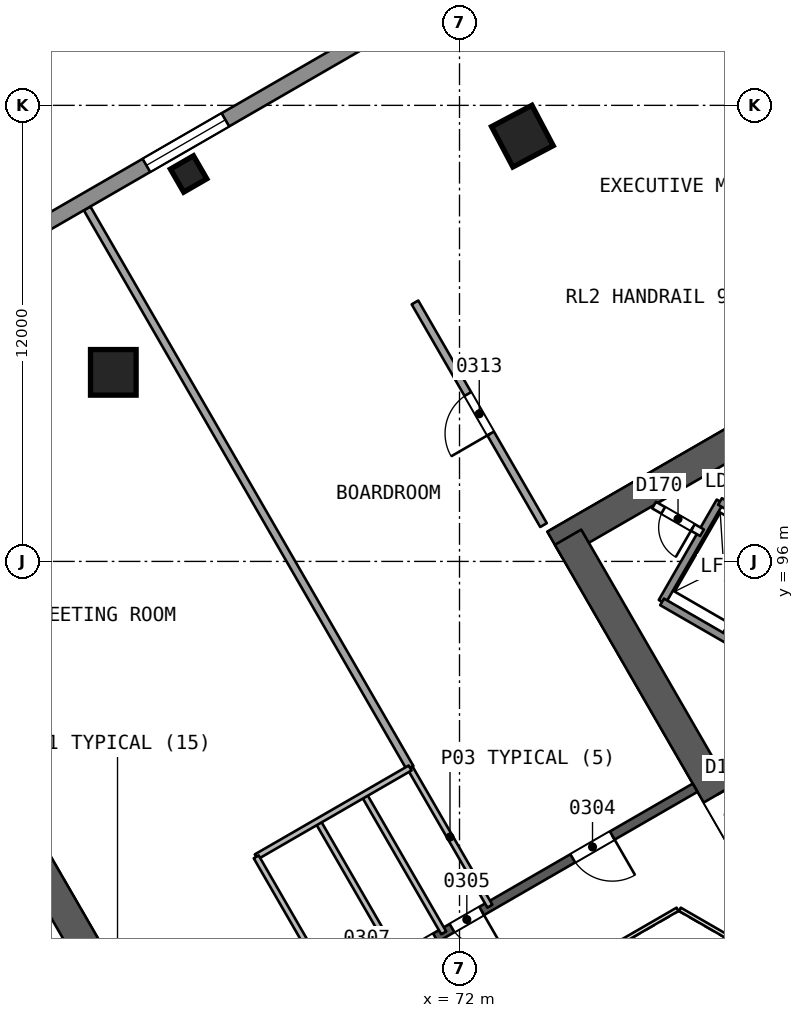
"""IFC4 building model, lengths in metres.
Left out: names, types, materials, properties, quantities, classifications, styles, units other than length and angle.
Written with IfcOpenShell. Run it as: python <this file> out.ifc"""

import sys

from ifc_helpers import new_model, si_unit, direction, frame, frame_2d, origin, origin_2d, place, context, subcontext, project, spatial, rectangle, extrude, element, fill, save


model = new_model("IFC4")
c1 = context("Model", 3, precision=1e-05, world=origin(), true_north=direction((0.0, 1.0)))
c2 = subcontext(c1, "Body", "Model", "MODEL_VIEW")
j1 = project(units=[si_unit("LENGTHUNIT", "METRE"), si_unit("PLANEANGLEUNIT", "RADIAN")], contexts=[c1])
p1 = place(None, origin())
s1 = spatial("IfcSite", under=j1, at=p1, CompositionType="ELEMENT")
p2 = place(p1, origin())
s2 = spatial("IfcBuilding", under=s1, at=p2, CompositionType="ELEMENT")
p3 = place(p2, frame((0.0, 0.0, 20.4)))
s3 = spatial("IfcBuildingStorey", under=s2, at=p3, CompositionType="ELEMENT", Elevation=20.4)
p4 = place(p3, frame((65.538, 80.0, 0.0), z_axis=(0.0, 0.0, 1.0), x_axis=(-0.49999662545, 0.866027352073, 0.0)))
e1 = element("IfcWall", 1, at=p4, inside=s3, PredefinedType="SHEAR", context=c2, shape_type="SweptSolid", body=[
    extrude(rectangle(XDim=10.149, YDim=0.8, at=frame_2d((5.074, 0.0))), origin(), (0.0, 0.0, 1.0), 5.0),
])
p5 = place(p4, frame((0.719, 0.0, 0.0)))
e2 = element("IfcOpeningElement", 2, at=p5, cuts=e1, PredefinedType="OPENING", context=c2, shape_type="SweptSolid", body=[
    extrude(rectangle(XDim=1.2, YDim=2.1, at=frame_2d((0.6, 1.05))), frame((0.0, 0.411, 0.0), z_axis=(0.0, -1.0, 0.0), x_axis=(1.0, 0.0, 0.0)), (0.0, 0.0, 1.0), 0.821),
])
p6 = place(p3, frame((86.723, 103.488, 0.0), z_axis=(0.0, 0.0, 1.0), x_axis=(-0.866032504327, -0.499987701298, 0.0)))
e3 = element("IfcWall", 3, at=p6, inside=s3, PredefinedType="SHEAR", context=c2, shape_type="SweptSolid", body=[
    extrude(rectangle(XDim=14.102, YDim=0.8, at=frame_2d((7.051, 0.0))), origin(), (0.0, 0.0, 1.0), 5.0),
])
p7 = place(p3, frame((74.856, 96.637, 0.0), z_axis=(0.0, 0.0, 1.0), x_axis=(0.499993500917, -0.866029155999, 0.0)))
e4 = element("IfcWall", 4, at=p7, inside=s3, PredefinedType="SHEAR", context=c2, shape_type="SweptSolid", body=[
    extrude(rectangle(XDim=9.98, YDim=0.8, at=frame_2d((4.99, 0.0))), origin(), (0.0, 0.0, 1.0), 5.0),
])
p8 = place(p7, frame((7.83, 0.0, 0.0)))
e5 = element("IfcOpeningElement", 5, at=p8, cuts=e4, PredefinedType="OPENING", context=c2, shape_type="SweptSolid", body=[
    extrude(rectangle(XDim=1.2, YDim=2.1, at=frame_2d((0.6, 1.05))), frame((0.0, 0.411, 0.0), z_axis=(0.0, -1.0, 0.0), x_axis=(1.0, 0.0, 0.0)), (0.0, 0.0, 1.0), 0.821),
])
p9 = place(p3, frame((78.2, 90.046, 0.0), z_axis=(0.0, 0.0, 1.0), x_axis=(-0.866026492143, -0.499998114903, 0.0)))
e6 = element("IfcWall", 6, at=p9, inside=s3, PredefinedType="SHEAR", context=c2, shape_type="SweptSolid", body=[
    extrude(rectangle(XDim=15.588, YDim=0.25, at=frame_2d((7.794, 0.0))), origin(), (0.0, 0.0, 1.0), 4.5),
])
p10 = place(p9, frame((2.518, 0.0, 0.0)))
e7 = element("IfcOpeningElement", 7, at=p10, cuts=e6, PredefinedType="OPENING", context=c2, shape_type="SweptSolid", body=[
    extrude(rectangle(XDim=1.2, YDim=2.4, at=frame_2d((0.6, 1.2))), frame((0.0, 0.135, 0.0), z_axis=(0.0, -1.0, 0.0), x_axis=(1.0, 0.0, 0.0)), (0.0, 0.0, 1.0), 0.271),
])
p11 = place(p9, frame((6.487, 0.0, 0.0)))
e8 = element("IfcOpeningElement", 8, at=p11, cuts=e6, PredefinedType="OPENING", context=c2, shape_type="SweptSolid", body=[
    extrude(rectangle(XDim=0.9, YDim=2.1, at=frame_2d((0.45, 1.05))), frame((0.0, 0.135, 0.0), z_axis=(0.0, -1.0, 0.0), x_axis=(1.0, 0.0, 0.0)), (0.0, 0.0, 1.0), 0.271),
])
p12 = place(p9, frame((7.89, 0.0, 0.0)))
e9 = element("IfcOpeningElement", 9, at=p12, cuts=e6, PredefinedType="OPENING", context=c2, shape_type="SweptSolid", body=[
    extrude(rectangle(XDim=0.9, YDim=2.1, at=frame_2d((0.45, 1.05))), frame((0.0, 0.135, 0.0), z_axis=(0.0, -1.0, 0.0), x_axis=(1.0, 0.0, 0.0)), (0.0, 0.0, 1.0), 0.271),
])
p13 = place(p9, frame((9.527, 0.0, 0.0)))
e10 = element("IfcOpeningElement", 10, at=p13, cuts=e6, PredefinedType="OPENING", context=c2, shape_type="SweptSolid", body=[
    extrude(rectangle(XDim=0.9, YDim=2.1, at=frame_2d((0.45, 1.05))), frame((0.0, 0.135, 0.0), z_axis=(0.0, -1.0, 0.0), x_axis=(1.0, 0.0, 0.0)), (0.0, 0.0, 1.0), 0.271),
])
p14 = place(p9, frame((12.65, 0.0, 0.0)))
e11 = element("IfcOpeningElement", 11, at=p14, cuts=e6, PredefinedType="OPENING", context=c2, shape_type="SweptSolid", body=[
    extrude(rectangle(XDim=1.2, YDim=2.4, at=frame_2d((0.6, 1.2))), frame((0.0, 0.135, 0.0), z_axis=(0.0, -1.0, 0.0), x_axis=(1.0, 0.0, 0.0)), (0.0, 0.0, 1.0), 0.271),
])
p15 = place(p3, frame((73.654, 107.217, 0.0), z_axis=(0.000878676521, -0.022845589543, 0.999738619323), x_axis=(0.865610658268, 0.500603787219, 0.010678788114)))
e12 = element("IfcColumn", 12, at=p15, inside=s3, PredefinedType="COLUMN", context=c2, shape_type="SweptSolid", body=[
    extrude(rectangle(XDim=1.2, YDim=1.2, at=origin_2d()), origin(), (0.0, 0.0, 1.0), 5.001),
])
p16 = place(p3, frame((62.878, 100.996, 0.0), z_axis=(0.010056548747, -0.017476914813, 0.999796690971), x_axis=(0.866747029638, 0.498748019158, 9.2908e-08)))
e13 = element("IfcColumn", 13, at=p16, inside=s3, PredefinedType="COLUMN", context=c2, shape_type="SweptSolid", body=[
    extrude(rectangle(XDim=1.2, YDim=1.2, at=origin_2d()), origin(), (0.0, 0.0, 1.0), 5.001),
])
p17 = place(p3, frame((64.871, 106.195, 0.0), z_axis=(0.0, 0.0, 1.0), x_axis=(0.866025403784, 0.5, 0.0)))
e14 = element("IfcColumn", 14, at=p17, inside=s3, PredefinedType="COLUMN", context=c2, shape_type="SweptSolid", body=[
    extrude(rectangle(XDim=0.7, YDim=0.7, at=origin_2d()), origin(), (0.0, 0.0, 1.0), 5.0),
])
p18 = place(p3, frame((70.7, 90.565, 0.0), z_axis=(0.0, 0.0, 1.0), x_axis=(0.500027713859, -0.866009402589, 0.0)))
e15 = element("IfcWall", 15, at=p18, inside=s3, PredefinedType="PARTITIONING", context=c2, shape_type="SweptSolid", body=[
    extrude(rectangle(XDim=4.2, YDim=0.15, at=frame_2d((2.1, 0.0))), origin(), (0.0, 0.0, 1.0), 4.5),
])
p19 = place(p3, frame((62.2, 105.289, 0.0), z_axis=(0.0, 0.0, 1.0), x_axis=(0.49999717083, -0.8660270372, 0.0)))
e16 = element("IfcWall", 16, at=p19, inside=s3, PredefinedType="PARTITIONING", context=c2, shape_type="SweptSolid", body=[
    extrude(rectangle(XDim=17.001, YDim=0.2, at=frame_2d((8.5, 0.0))), origin(), (0.0, 0.0, 1.0), 4.5),
])
p20 = place(p3, frame((74.21, 96.956, 0.0), z_axis=(0.0, 0.0, 1.0), x_axis=(-0.499981745636, 0.86603594269, 0.0)))
e17 = element("IfcWall", 17, at=p20, inside=s3, PredefinedType="PARTITIONING", context=c2, shape_type="SweptSolid", body=[
    extrude(rectangle(XDim=6.765, YDim=0.2, at=frame_2d((3.382, 0.0))), origin(), (0.0, 0.0, 1.0), 4.5),
])
p21 = place(p20, frame((2.782, 0.0, 0.0)))
e18 = element("IfcOpeningElement", 18, at=p21, cuts=e17, PredefinedType="OPENING", context=c2, shape_type="SweptSolid", body=[
    extrude(rectangle(XDim=1.2, YDim=2.4, at=frame_2d((0.6, 1.2))), frame((0.0, 0.11, 0.0), z_axis=(0.0, -1.0, 0.0), x_axis=(1.0, 0.0, 0.0)), (0.0, 0.0, 1.0), 0.221),
])
p22 = place(p3, frame((69.485, 89.864, 0.0), z_axis=(0.0, 0.0, 1.0), x_axis=(0.49998411664, -0.866034573852, 0.0)))
e19 = element("IfcWall", 19, at=p22, inside=s3, PredefinedType="PARTITIONING", context=c2, shape_type="SweptSolid", body=[
    extrude(rectangle(XDim=4.2, YDim=0.15, at=frame_2d((2.1, 0.0))), origin(), (0.0, 0.0, 1.0), 4.5),
])
p23 = place(p3, frame((68.27, 89.163, 0.0), z_axis=(0.0, 0.0, 1.0), x_axis=(0.500002543286, -0.866023935413, 0.0)))
e20 = element("IfcWall", 20, at=p23, inside=s3, PredefinedType="PARTITIONING", context=c2, shape_type="SweptSolid", body=[
    extrude(rectangle(XDim=4.2, YDim=0.15, at=frame_2d((2.1, 0.0))), origin(), (0.0, 0.0, 1.0), 4.5),
])
p24 = place(p3, frame((70.7, 90.565, 0.0), z_axis=(0.0, 0.0, 1.0), x_axis=(-0.866017799667, -0.500013170487, 0.0)))
e21 = element("IfcWall", 21, at=p24, inside=s3, PredefinedType="PARTITIONING", context=c2, shape_type="SweptSolid", body=[
    extrude(rectangle(XDim=4.677, YDim=0.15, at=frame_2d((2.338, 0.0))), origin(), (0.0, 0.0, 1.0), 4.5),
])
p25 = place(p3, frame((66.65, 88.226, 0.0), z_axis=(0.0, 0.0, 1.0), x_axis=(0.500016035621, -0.866016145416, 0.0)))
e22 = element("IfcWall", 22, at=p25, inside=s3, PredefinedType="PARTITIONING", context=c2, shape_type="SweptSolid", body=[
    extrude(rectangle(XDim=4.199, YDim=0.15, at=frame_2d((2.1, 0.0))), origin(), (0.0, 0.0, 1.0), 4.5),
])
p26 = place(p3, frame((26.66, 85.0, 0.0), z_axis=(0.0, 0.0, 1.0), x_axis=(0.866025599265, 0.499999661418, 0.0)))
e23 = element("IfcWall", 23, at=p26, inside=s3, PredefinedType="SOLIDWALL", context=c2, shape_type="SweptSolid", body=[
    extrude(rectangle(XDim=78.727, YDim=0.4, at=frame_2d((39.364, 0.0))), origin(), (0.0, 0.0, 1.0), 4.5),
])
p27 = place(p26, frame((42.84, 0.0, 0.9)))
e24 = element("IfcOpeningElement", 24, at=p27, cuts=e23, PredefinedType="OPENING", context=c2, shape_type="SweptSolid", body=[
    extrude(rectangle(XDim=2.4, YDim=2.4, at=frame_2d((1.2, 1.2))), frame((0.0, 0.21, 0.0), z_axis=(0.0, -1.0, 0.0), x_axis=(1.0, 0.0, 0.0)), (0.0, 0.0, 1.0), 0.421),
])
p28 = place(p26, frame((37.385, 0.0, 0.9)))
e25 = element("IfcOpeningElement", 25, at=p28, cuts=e23, PredefinedType="OPENING", context=c2, shape_type="SweptSolid", body=[
    extrude(rectangle(XDim=2.4, YDim=2.4, at=frame_2d((1.2, 1.2))), frame((0.0, 0.21, 0.0), z_axis=(0.0, -1.0, 0.0), x_axis=(1.0, 0.0, 0.0)), (0.0, 0.0, 1.0), 0.421),
])
p29 = place(p26, frame((32.708, 0.0, 0.9)))
e26 = element("IfcOpeningElement", 26, at=p29, cuts=e23, PredefinedType="OPENING", context=c2, shape_type="SweptSolid", body=[
    extrude(rectangle(XDim=2.4, YDim=2.4, at=frame_2d((1.2, 1.2))), frame((0.0, 0.21, 0.0), z_axis=(0.0, -1.0, 0.0), x_axis=(1.0, 0.0, 0.0)), (0.0, 0.0, 1.0), 0.421),
])
for number, where, z_axis, x_axis in (
    (27, (78.976, 93.986, 0.0), (0.0, 0.0, 1.0), (0.5, 0.866, 0.0)),
    (28, (77.33, 94.936, 0.0), (0.0, 0.0, 1.0), (0.5, 0.866, 0.0)),
):
    element("IfcWall", number, at=place(p3, frame(where, z_axis=z_axis, x_axis=x_axis)), inside=s3, PredefinedType="SOLIDWALL", context=c2, shape_type="SweptSolid", body=[
        extrude(rectangle(XDim=3.05, YDim=0.2, at=frame_2d((1.525, 0.0))), origin(), (0.0, 0.0, 1.0), 4.5),
    ])
p30 = place(p3, frame((86.77, 89.486, 0.0), z_axis=(0.0, 0.0, 1.0), x_axis=(-0.86601811187, 0.500012629753, 0.0)))
e29 = element("IfcWall", 29, at=p30, inside=s3, PredefinedType="SOLIDWALL", context=c2, shape_type="SweptSolid", body=[
    extrude(rectangle(XDim=10.9, YDim=0.2, at=frame_2d((5.45, 0.0))), origin(), (0.0, 0.0, 1.0), 4.5),
])
p31 = place(p3, frame((78.38, 96.755, 0.0), z_axis=(0.0, 0.0, 1.0), x_axis=(-0.866003949776, 0.500037157592, 0.0)))
e30 = element("IfcWall", 30, at=p31, inside=s3, PredefinedType="PARTITIONING", context=c2, shape_type="SweptSolid", body=[
    extrude(rectangle(XDim=1.455, YDim=0.2, at=frame_2d((0.728, 0.0))), origin(), (0.0, 0.0, 1.0), 4.5),
])
p32 = place(p31, frame((0.278, 0.0, 0.0)))
e31 = element("IfcOpeningElement", 31, at=p32, cuts=e30, PredefinedType="OPENING", context=c2, shape_type="SweptSolid", body=[
    extrude(rectangle(XDim=0.9, YDim=2.1, at=frame_2d((0.45, 1.05))), frame((0.0, 0.11, 0.0), z_axis=(0.0, -1.0, 0.0), x_axis=(1.0, 0.0, 0.0)), (0.0, 0.0, 1.0), 0.221),
])
p33 = place(p3, frame((80.5, 96.627, 0.0), z_axis=(0.0, 0.0, 1.0), x_axis=(-0.86601224135, 0.500022797313, 0.0)))
e32 = element("IfcWall", 32, at=p33, inside=s3, PredefinedType="SOLIDWALL", context=c2, shape_type="SweptSolid", body=[
    extrude(rectangle(XDim=1.9, YDim=0.2, at=frame_2d((0.95, 0.0))), origin(), (0.0, 0.0, 1.0), 4.5),
])
p34 = place(p33, frame((0.4, 0.0, 0.0)))
e33 = element("IfcOpeningElement", 33, at=p34, cuts=e32, PredefinedType="OPENING", context=c2, shape_type="SweptSolid", body=[
    extrude(rectangle(XDim=1.1, YDim=2.1, at=frame_2d((0.55, 1.05))), frame((0.0, 0.11, 0.0), z_axis=(0.0, -1.0, 0.0), x_axis=(1.0, 0.0, 0.0)), (0.0, 0.0, 1.0), 0.221),
])
p35 = place(p3, frame((79.53, 85.846, 0.0), z_axis=(0.0, 0.0, 1.0), x_axis=(-0.866041268327, 0.499972520799, 0.0)))
e34 = element("IfcWall", 34, at=p35, inside=s3, PredefinedType="PARTITIONING", context=c2, shape_type="SweptSolid", body=[
    extrude(rectangle(XDim=2.0, YDim=0.1, at=frame_2d((1.0, 0.0))), origin(), (0.0, 0.0, 1.0), 4.5),
])
p36 = place(p3, frame((77.738, 86.846, 0.0), z_axis=(0.0, 0.0, 1.0), x_axis=(-0.866026658274, -0.499997827154, 0.0)))
e35 = element("IfcWall", 35, at=p36, inside=s3, PredefinedType="PARTITIONING", context=c2, shape_type="SweptSolid", body=[
    extrude(rectangle(XDim=11.588, YDim=0.1, at=frame_2d((5.794, 0.0))), origin(), (0.0, 0.0, 1.0), 4.5),
])
p37 = place(p10, origin())
e36 = element("IfcDoor", 36, at=p37, inside=s3, OperationType="SINGLE_SWING_LEFT", PredefinedType="NOTDEFINED", context=c2, shape_type="SweptSolid", body=[
    extrude(rectangle(XDim=1.2, YDim=2.4, at=frame_2d((0.6, 1.2))), frame((0.0, 0.025, 0.0), z_axis=(0.0, -1.0, 0.0), x_axis=(1.0, 0.0, 0.0)), (0.0, 0.0, 1.0), 0.05),
])
fill(e7, e36)
p38 = place(p11, origin())
e37 = element("IfcDoor", 37, at=p38, inside=s3, OperationType="SINGLE_SWING_LEFT", PredefinedType="NOTDEFINED", context=c2, shape_type="SweptSolid", body=[
    extrude(rectangle(XDim=0.9, YDim=2.1, at=frame_2d((0.45, 1.05))), frame((0.0, 0.025, 0.0), z_axis=(0.0, -1.0, 0.0), x_axis=(1.0, 0.0, 0.0)), (0.0, 0.0, 1.0), 0.05),
])
fill(e8, e37)
p39 = place(p12, origin())
e38 = element("IfcDoor", 38, at=p39, inside=s3, OperationType="SINGLE_SWING_RIGHT", PredefinedType="NOTDEFINED", context=c2, shape_type="SweptSolid", body=[
    extrude(rectangle(XDim=0.9, YDim=2.1, at=frame_2d((0.45, 1.05))), frame((0.0, 0.025, 0.0), z_axis=(0.0, -1.0, 0.0), x_axis=(1.0, 0.0, 0.0)), (0.0, 0.0, 1.0), 0.05),
])
fill(e9, e38)
p40 = place(p21, origin())
e39 = element("IfcDoor", 39, at=p40, inside=s3, OperationType="SINGLE_SWING_LEFT", PredefinedType="NOTDEFINED", context=c2, shape_type="SweptSolid", body=[
    extrude(rectangle(XDim=1.2, YDim=2.4, at=frame_2d((0.6, 1.2))), frame((0.0, 0.025, 0.0), z_axis=(0.0, -1.0, 0.0), x_axis=(1.0, 0.0, 0.0)), (0.0, 0.0, 1.0), 0.05),
])
fill(e18, e39)
p41 = place(p27, origin())
e40 = element("IfcWindow", 40, at=p41, inside=s3, PartitioningType="SINGLE_PANEL", PredefinedType="WINDOW", context=c2, shape_type="SweptSolid", body=[
    extrude(rectangle(XDim=2.4, YDim=2.4, at=frame_2d((1.2, 1.2))), frame((0.0, 0.03, 0.0), z_axis=(0.0, -1.0, 0.0), x_axis=(1.0, 0.0, 0.0)), (0.0, 0.0, 1.0), 0.06),
])
fill(e24, e40)
p42 = place(p8, origin())
e41 = element("IfcDoor", 41, at=p42, inside=s3, OperationType="SINGLE_SWING_LEFT", PredefinedType="NOTDEFINED", context=c2, shape_type="SweptSolid", body=[
    extrude(rectangle(XDim=1.2, YDim=2.1, at=frame_2d((0.6, 1.05))), frame((0.0, 0.025, 0.0), z_axis=(0.0, -1.0, 0.0), x_axis=(1.0, 0.0, 0.0)), (0.0, 0.0, 1.0), 0.05),
])
fill(e5, e41)
p43 = place(p32, origin())
e42 = element("IfcDoor", 42, at=p43, inside=s3, OperationType="SINGLE_SWING_LEFT", PredefinedType="NOTDEFINED", context=c2, shape_type="SweptSolid", body=[
    extrude(rectangle(XDim=0.9, YDim=2.1, at=frame_2d((0.45, 1.05))), frame((0.0, 0.025, 0.0), z_axis=(0.0, -1.0, 0.0), x_axis=(1.0, 0.0, 0.0)), (0.0, 0.0, 1.0), 0.05),
])
fill(e31, e42)
save(model, sys.argv[1])
